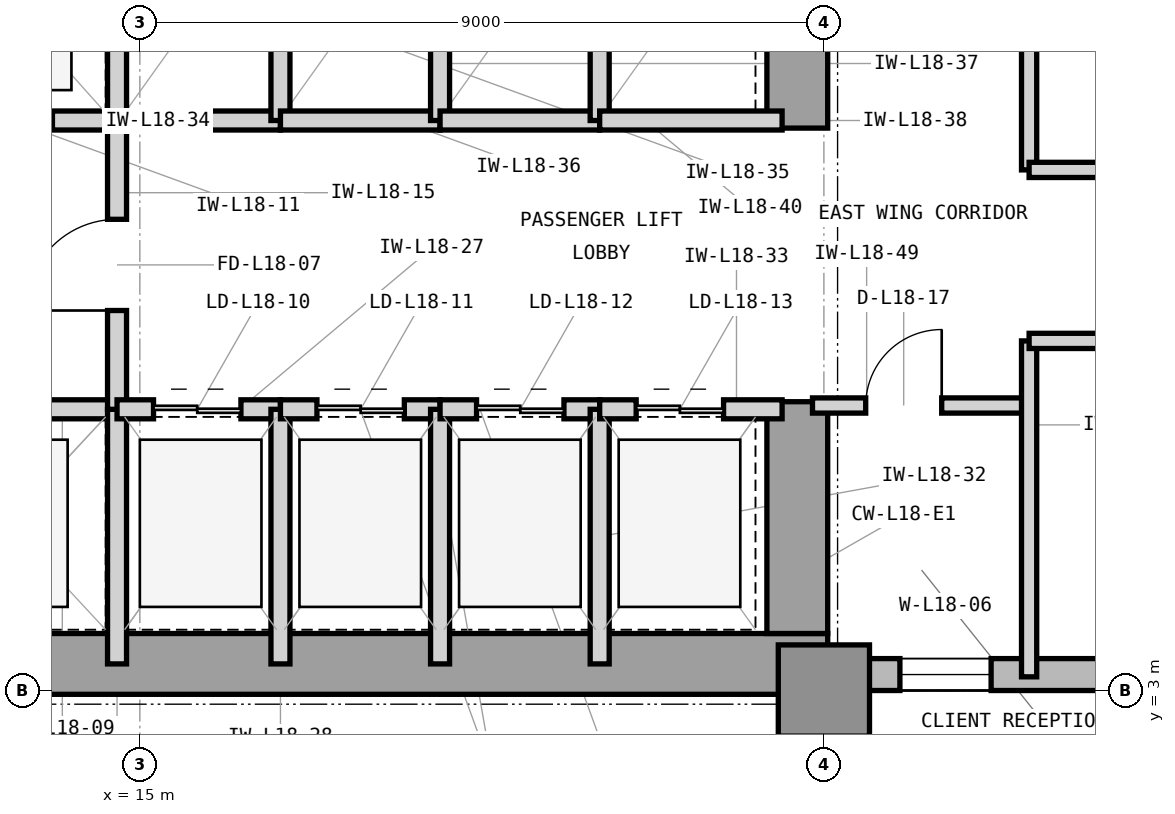
"""IFC4 building model, lengths in metres.
Left out: names, types, materials, properties, quantities, classifications, styles, units other than length and angle.
Written with IfcOpenShell. Run it as: python <this file> out.ifc"""

import sys

from ifc_helpers import new_model, si_unit, direction, frame, frame_2d, origin, origin_2d, place, context, subcontext, project, spatial, rectangle, extrude, element, fill, save


model = new_model("IFC4")
c1 = context("Model", 3, precision=1e-05, world=origin(), true_north=direction((0.0, 1.0)))
c2 = subcontext(c1, "Body", "Model", "MODEL_VIEW")
j1 = project(units=[si_unit("LENGTHUNIT", "METRE"), si_unit("PLANEANGLEUNIT", "RADIAN")], contexts=[c1])
p1 = place(None, origin())
s1 = spatial("IfcSite", under=j1, at=p1, CompositionType="ELEMENT")
p2 = place(p1, origin())
s2 = spatial("IfcBuilding", under=s1, at=p2, CompositionType="ELEMENT")
p3 = place(p2, frame((0.0, 0.0, 80.4)))
s3 = spatial("IfcBuildingStorey", under=s2, at=p3, CompositionType="ELEMENT", Elevation=80.4)
p4 = place(p3, frame((7.475, 3.35, 0.0), z_axis=(0.0, 0.0, 1.0), x_axis=(1.0, 0.0, 0.0)))
e1 = element("IfcWall", 1, at=p4, inside=s3, PredefinedType="SHEAR", context=c2, shape_type="SweptSolid", body=[
    extrude(rectangle(XDim=16.575, YDim=0.8, at=frame_2d((8.288, 0.0))), origin(), (0.0, 0.0, 1.0), 4.2),
])
p5 = place(p3, frame((23.65, 3.75, 0.0), z_axis=(0.0, 0.0, 1.0), x_axis=(0.0, 1.0, 0.0)))
e2 = element("IfcWall", 2, at=p5, inside=s3, PredefinedType="SHEAR", context=c2, shape_type="SweptSolid", body=[
    extrude(rectangle(XDim=3.05, YDim=0.8, at=frame_2d((1.525, 0.0))), origin(), (0.0, 0.0, 1.0), 4.2),
])
p6 = place(p3, frame((23.65, 10.4, 0.0), z_axis=(0.0, 0.0, 1.0), x_axis=(0.0, 1.0, 0.0)))
e3 = element("IfcWall", 3, at=p6, inside=s3, PredefinedType="SHEAR", context=c2, shape_type="SweptSolid", body=[
    extrude(rectangle(XDim=3.2, YDim=0.8, at=frame_2d((1.6, 0.0))), origin(), (0.0, 0.0, 1.0), 4.2),
])
p7 = place(p3, frame((24.0, 3.0, 0.0), z_axis=(0.0, 0.0, 1.0), x_axis=(1.0, 0.0, 0.0)))
e4 = element("IfcColumn", 4, at=p7, inside=s3, PredefinedType="COLUMN", context=c2, shape_type="SweptSolid", body=[
    extrude(rectangle(XDim=1.2, YDim=1.2, at=origin_2d()), origin(), (0.0, 0.0, 1.0), 4.2),
])
p8 = place(p3, frame((23.9, 3.21, 0.0), z_axis=(0.0, 0.0, 1.0), x_axis=(1.0, 0.0, 0.0)))
e5 = element("IfcWall", 5, at=p8, inside=s3, PredefinedType="STANDARD", context=c2, shape_type="SweptSolid", body=[
    extrude(rectangle(XDim=40.5, YDim=0.42, at=frame_2d((20.25, 0.0))), origin(), (0.0, 0.0, 1.0), 3.92),
])
p9 = place(p8, frame((1.1, 0.0, 0.85)))
e6 = element("IfcOpeningElement", 6, at=p9, cuts=e5, PredefinedType="OPENING", context=c2, shape_type="SweptSolid", body=[
    extrude(rectangle(XDim=1.2, YDim=2.45, at=frame_2d((0.6, 1.225))), frame((0.0, 0.22, 0.0), z_axis=(0.0, -1.0, 0.0), x_axis=(1.0, 0.0, 0.0)), (0.0, 0.0, 1.0), 0.44),
])
p10 = place(p8, frame((5.336, 0.0, 0.85)))
e7 = element("IfcOpeningElement", 7, at=p10, cuts=e5, PredefinedType="OPENING", context=c2, shape_type="SweptSolid", body=[
    extrude(rectangle(XDim=2.8, YDim=2.45, at=frame_2d((1.4, 1.225))), frame((0.0, 0.22, 0.0), z_axis=(0.0, -1.0, 0.0), x_axis=(1.0, 0.0, 0.0)), (0.0, 0.0, 1.0), 0.44),
])
p11 = place(p8, frame((14.136, 0.0, 0.85)))
e8 = element("IfcOpeningElement", 8, at=p11, cuts=e5, PredefinedType="OPENING", context=c2, shape_type="SweptSolid", body=[
    extrude(rectangle(XDim=2.8, YDim=2.45, at=frame_2d((1.4, 1.225))), frame((0.0, 0.22, 0.0), z_axis=(0.0, -1.0, 0.0), x_axis=(1.0, 0.0, 0.0)), (0.0, 0.0, 1.0), 0.44),
])
p12 = place(p8, frame((20.336, 0.0, 0.85)))
e9 = element("IfcOpeningElement", 9, at=p12, cuts=e5, PredefinedType="OPENING", context=c2, shape_type="SweptSolid", body=[
    extrude(rectangle(XDim=2.8, YDim=2.45, at=frame_2d((1.4, 1.225))), frame((0.0, 0.22, 0.0), z_axis=(0.0, -1.0, 0.0), x_axis=(1.0, 0.0, 0.0)), (0.0, 0.0, 1.0), 0.44),
])
p13 = place(p3, frame((11.82, 6.7, 0.0), z_axis=(0.0, 0.0, 1.0), x_axis=(1.0, 0.0, 0.0)))
e10 = element("IfcWall", 10, at=p13, inside=s3, PredefinedType="PARTITIONING", context=c2, shape_type="SweptSolid", body=[
    extrude(rectangle(XDim=2.88, YDim=0.25, at=frame_2d((1.44, 0.0))), origin(), (0.0, 0.0, 1.0), 3.293),
])
p14 = place(p13, frame((0.85, 0.0, 0.0)))
e11 = element("IfcOpeningElement", 11, at=p14, cuts=e10, PredefinedType="OPENING", context=c2, shape_type="SweptSolid", body=[
    extrude(rectangle(XDim=1.1, YDim=2.25, at=frame_2d((0.55, 1.125))), frame((0.0, 0.135, 0.0), z_axis=(0.0, -1.0, 0.0), x_axis=(1.0, 0.0, 0.0)), (0.0, 0.0, 1.0), 0.27),
])
p15 = place(p3, frame((14.7, 3.35, 0.0), z_axis=(0.0, 0.0, 1.0), x_axis=(0.0, 1.0, 0.0)))
e12 = element("IfcWall", 12, at=p15, inside=s3, PredefinedType="PARTITIONING", context=c2, shape_type="SweptSolid", body=[
    extrude(rectangle(XDim=3.35, YDim=0.25, at=frame_2d((1.675, 0.0))), origin(), (0.0, 0.0, 1.0), 3.91),
])
p16 = place(p3, frame((11.95, 10.5, 0.0), z_axis=(0.0, 0.0, 1.0), x_axis=(1.0, 0.0, 0.0)))
e13 = element("IfcWall", 13, at=p16, inside=s3, PredefinedType="PARTITIONING", context=c2, shape_type="SweptSolid", body=[
    extrude(rectangle(XDim=2.75, YDim=0.25, at=frame_2d((1.375, 0.0))), origin(), (0.0, 0.0, 1.0), 3.293),
])
p17 = place(p16, frame((0.8, 0.0, 0.0)))
e14 = element("IfcOpeningElement", 14, at=p17, cuts=e13, PredefinedType="OPENING", context=c2, shape_type="SweptSolid", body=[
    extrude(rectangle(XDim=1.1, YDim=2.25, at=frame_2d((0.55, 1.125))), frame((0.0, 0.135, 0.0), z_axis=(0.0, -1.0, 0.0), x_axis=(1.0, 0.0, 0.0)), (0.0, 0.0, 1.0), 0.27),
])
p18 = place(p3, frame((14.7, 10.5, 0.0), z_axis=(0.0, 0.0, 1.0), x_axis=(0.0, 1.0, 0.0)))
e15 = element("IfcWall", 15, at=p18, inside=s3, PredefinedType="PARTITIONING", context=c2, shape_type="SweptSolid", body=[
    extrude(rectangle(XDim=3.0, YDim=0.25, at=frame_2d((1.5, 0.0))), origin(), (0.0, 0.0, 1.0), 3.91),
])
p19 = place(p3, frame((14.7, 6.7, 0.0), z_axis=(0.0, 0.0, 1.0), x_axis=(0.0, 1.0, 0.0)))
e16 = element("IfcWall", 16, at=p19, inside=s3, PredefinedType="PARTITIONING", context=c2, shape_type="SweptSolid", body=[
    extrude(rectangle(XDim=3.8, YDim=0.25, at=frame_2d((1.9, 0.0))), origin(), (0.0, 0.0, 1.0), 3.91),
])
p20 = place(p19, frame((1.3, 0.0, 0.0)))
e17 = element("IfcOpeningElement", 17, at=p20, cuts=e16, PredefinedType="OPENING", context=c2, shape_type="SweptSolid", body=[
    extrude(rectangle(XDim=1.2, YDim=2.2, at=frame_2d((0.6, 1.1))), frame((0.0, 0.135, 0.0), z_axis=(0.0, -1.0, 0.0), x_axis=(1.0, 0.0, 0.0)), (0.0, 0.0, 1.0), 0.27),
])
p21 = place(p3, frame((14.7, 6.7, 0.0), z_axis=(0.0, 0.0, 1.0), x_axis=(1.0, 0.0, 0.0)))
e18 = element("IfcWall", 18, at=p21, inside=s3, PredefinedType="PARTITIONING", context=c2, shape_type="SweptSolid", body=[
    extrude(rectangle(XDim=2.15, YDim=0.25, at=frame_2d((1.075, 0.0))), origin(), (0.0, 0.0, 1.0), 3.293),
])
p22 = place(p21, frame((0.48, 0.0, 0.0)))
e19 = element("IfcOpeningElement", 19, at=p22, cuts=e18, PredefinedType="OPENING", context=c2, shape_type="SweptSolid", body=[
    extrude(rectangle(XDim=1.15, YDim=2.25, at=frame_2d((0.575, 1.125))), frame((0.0, 0.135, 0.0), z_axis=(0.0, -1.0, 0.0), x_axis=(1.0, 0.0, 0.0)), (0.0, 0.0, 1.0), 0.27),
])
p23 = place(p3, frame((16.85, 3.35, 0.0), z_axis=(0.0, 0.0, 1.0), x_axis=(0.0, 1.0, 0.0)))
e20 = element("IfcWall", 20, at=p23, inside=s3, PredefinedType="PARTITIONING", context=c2, shape_type="SweptSolid", body=[
    extrude(rectangle(XDim=3.35, YDim=0.25, at=frame_2d((1.675, 0.0))), origin(), (0.0, 0.0, 1.0), 3.91),
])
p24 = place(p3, frame((16.85, 6.7, 0.0), z_axis=(0.0, 0.0, 1.0), x_axis=(1.0, 0.0, 0.0)))
e21 = element("IfcWall", 21, at=p24, inside=s3, PredefinedType="PARTITIONING", context=c2, shape_type="SweptSolid", body=[
    extrude(rectangle(XDim=2.1, YDim=0.25, at=frame_2d((1.05, 0.0))), origin(), (0.0, 0.0, 1.0), 3.293),
])
p25 = place(p24, frame((0.48, 0.0, 0.0)))
e22 = element("IfcOpeningElement", 22, at=p25, cuts=e21, PredefinedType="OPENING", context=c2, shape_type="SweptSolid", body=[
    extrude(rectangle(XDim=1.15, YDim=2.25, at=frame_2d((0.575, 1.125))), frame((0.0, 0.135, 0.0), z_axis=(0.0, -1.0, 0.0), x_axis=(1.0, 0.0, 0.0)), (0.0, 0.0, 1.0), 0.27),
])
p26 = place(p3, frame((18.95, 3.35, 0.0), z_axis=(0.0, 0.0, 1.0), x_axis=(0.0, 1.0, 0.0)))
e23 = element("IfcWall", 23, at=p26, inside=s3, PredefinedType="PARTITIONING", context=c2, shape_type="SweptSolid", body=[
    extrude(rectangle(XDim=3.35, YDim=0.25, at=frame_2d((1.675, 0.0))), origin(), (0.0, 0.0, 1.0), 3.91),
])
p27 = place(p3, frame((18.95, 6.7, 0.0), z_axis=(0.0, 0.0, 1.0), x_axis=(1.0, 0.0, 0.0)))
e24 = element("IfcWall", 24, at=p27, inside=s3, PredefinedType="PARTITIONING", context=c2, shape_type="SweptSolid", body=[
    extrude(rectangle(XDim=2.1, YDim=0.25, at=frame_2d((1.05, 0.0))), origin(), (0.0, 0.0, 1.0), 3.293),
])
p28 = place(p27, frame((0.48, 0.0, 0.0)))
e25 = element("IfcOpeningElement", 25, at=p28, cuts=e24, PredefinedType="OPENING", context=c2, shape_type="SweptSolid", body=[
    extrude(rectangle(XDim=1.15, YDim=2.25, at=frame_2d((0.575, 1.125))), frame((0.0, 0.135, 0.0), z_axis=(0.0, -1.0, 0.0), x_axis=(1.0, 0.0, 0.0)), (0.0, 0.0, 1.0), 0.27),
])
p29 = place(p3, frame((21.05, 3.35, 0.0), z_axis=(0.0, 0.0, 1.0), x_axis=(0.0, 1.0, 0.0)))
e26 = element("IfcWall", 26, at=p29, inside=s3, PredefinedType="PARTITIONING", context=c2, shape_type="SweptSolid", body=[
    extrude(rectangle(XDim=3.35, YDim=0.25, at=frame_2d((1.675, 0.0))), origin(), (0.0, 0.0, 1.0), 3.91),
])
p30 = place(p3, frame((21.05, 6.7, 0.0), z_axis=(0.0, 0.0, 1.0), x_axis=(1.0, 0.0, 0.0)))
e27 = element("IfcWall", 27, at=p30, inside=s3, PredefinedType="PARTITIONING", context=c2, shape_type="SweptSolid", body=[
    extrude(rectangle(XDim=2.4, YDim=0.25, at=frame_2d((1.2, 0.0))), origin(), (0.0, 0.0, 1.0), 3.293),
])
p31 = place(p30, frame((0.48, 0.0, 0.0)))
e28 = element("IfcOpeningElement", 28, at=p31, cuts=e27, PredefinedType="OPENING", context=c2, shape_type="SweptSolid", body=[
    extrude(rectangle(XDim=1.15, YDim=2.25, at=frame_2d((0.575, 1.125))), frame((0.0, 0.135, 0.0), z_axis=(0.0, -1.0, 0.0), x_axis=(1.0, 0.0, 0.0)), (0.0, 0.0, 1.0), 0.27),
])
p32 = place(p3, frame((14.7, 10.5, 0.0), z_axis=(0.0, 0.0, 1.0), x_axis=(1.0, 0.0, 0.0)))
e29 = element("IfcWall", 29, at=p32, inside=s3, PredefinedType="PARTITIONING", context=c2, shape_type="SweptSolid", body=[
    extrude(rectangle(XDim=2.15, YDim=0.25, at=frame_2d((1.075, 0.0))), origin(), (0.0, 0.0, 1.0), 3.293),
])
p33 = place(p3, frame((16.85, 10.5, 0.0), z_axis=(0.0, 0.0, 1.0), x_axis=(0.0, 1.0, 0.0)))
e30 = element("IfcWall", 30, at=p33, inside=s3, PredefinedType="PARTITIONING", context=c2, shape_type="SweptSolid", body=[
    extrude(rectangle(XDim=3.0, YDim=0.25, at=frame_2d((1.5, 0.0))), origin(), (0.0, 0.0, 1.0), 3.91),
])
p34 = place(p3, frame((16.85, 10.5, 0.0), z_axis=(0.0, 0.0, 1.0), x_axis=(1.0, 0.0, 0.0)))
e31 = element("IfcWall", 31, at=p34, inside=s3, PredefinedType="PARTITIONING", context=c2, shape_type="SweptSolid", body=[
    extrude(rectangle(XDim=2.1, YDim=0.25, at=frame_2d((1.05, 0.0))), origin(), (0.0, 0.0, 1.0), 3.293),
])
p35 = place(p3, frame((18.95, 10.5, 0.0), z_axis=(0.0, 0.0, 1.0), x_axis=(0.0, 1.0, 0.0)))
e32 = element("IfcWall", 32, at=p35, inside=s3, PredefinedType="PARTITIONING", context=c2, shape_type="SweptSolid", body=[
    extrude(rectangle(XDim=3.0, YDim=0.25, at=frame_2d((1.5, 0.0))), origin(), (0.0, 0.0, 1.0), 3.91),
])
p36 = place(p3, frame((18.95, 10.5, 0.0), z_axis=(0.0, 0.0, 1.0), x_axis=(1.0, 0.0, 0.0)))
e33 = element("IfcWall", 33, at=p36, inside=s3, PredefinedType="PARTITIONING", context=c2, shape_type="SweptSolid", body=[
    extrude(rectangle(XDim=2.1, YDim=0.25, at=frame_2d((1.05, 0.0))), origin(), (0.0, 0.0, 1.0), 3.293),
])
p37 = place(p3, frame((21.05, 10.5, 0.0), z_axis=(0.0, 0.0, 1.0), x_axis=(0.0, 1.0, 0.0)))
e34 = element("IfcWall", 34, at=p37, inside=s3, PredefinedType="PARTITIONING", context=c2, shape_type="SweptSolid", body=[
    extrude(rectangle(XDim=3.0, YDim=0.25, at=frame_2d((1.5, 0.0))), origin(), (0.0, 0.0, 1.0), 3.91),
])
p38 = place(p3, frame((21.05, 10.5, 0.0), z_axis=(0.0, 0.0, 1.0), x_axis=(1.0, 0.0, 0.0)))
e35 = element("IfcWall", 35, at=p38, inside=s3, PredefinedType="PARTITIONING", context=c2, shape_type="SweptSolid", body=[
    extrude(rectangle(XDim=2.4, YDim=0.25, at=frame_2d((1.2, 0.0))), origin(), (0.0, 0.0, 1.0), 3.293),
])
p39 = place(p3, frame((23.85, 6.75, 0.0), z_axis=(0.0, 0.0, 1.0), x_axis=(1.0, 0.0, 0.0)))
e36 = element("IfcWall", 36, at=p39, inside=s3, PredefinedType="PARTITIONING", context=c2, shape_type="SweptSolid", body=[
    extrude(rectangle(XDim=2.85, YDim=0.2, at=frame_2d((1.425, 0.0))), origin(), (0.0, 0.0, 1.0), 3.91),
])
p40 = place(p39, frame((0.7, 0.0, 0.0)))
e37 = element("IfcOpeningElement", 37, at=p40, cuts=e36, PredefinedType="OPENING", context=c2, shape_type="SweptSolid", body=[
    extrude(rectangle(XDim=1.0, YDim=2.15, at=frame_2d((0.5, 1.075))), frame((0.0, 0.11, 0.0), z_axis=(0.0, -1.0, 0.0), x_axis=(1.0, 0.0, 0.0)), (0.0, 0.0, 1.0), 0.22),
])
p41 = place(p3, frame((26.7, 3.18, 0.0), z_axis=(0.0, 0.0, 1.0), x_axis=(0.0, 1.0, 0.0)))
e38 = element("IfcWall", 38, at=p41, inside=s3, PredefinedType="PARTITIONING", context=c2, shape_type="SweptSolid", body=[
    extrude(rectangle(XDim=4.42, YDim=0.2, at=frame_2d((2.21, 0.0))), origin(), (0.0, 0.0, 1.0), 3.91),
])
p42 = place(p3, frame((26.7, 9.85, 0.0), z_axis=(0.0, 0.0, 1.0), x_axis=(0.0, 1.0, 0.0)))
e39 = element("IfcWall", 39, at=p42, inside=s3, PredefinedType="PARTITIONING", context=c2, shape_type="SweptSolid", body=[
    extrude(rectangle(XDim=10.97, YDim=0.2, at=frame_2d((5.485, 0.0))), origin(), (0.0, 0.0, 1.0), 3.91),
])
p43 = place(p3, frame((26.7, 7.6, 0.0), z_axis=(0.0, 0.0, 1.0), x_axis=(1.0, 0.0, 0.0)))
e40 = element("IfcWall", 40, at=p43, inside=s3, PredefinedType="PARTITIONING", context=c2, shape_type="SweptSolid", body=[
    extrude(rectangle(XDim=9.0, YDim=0.2, at=frame_2d((4.5, 0.0))), origin(), (0.0, 0.0, 1.0), 3.91),
])
p44 = place(p43, frame((3.5, 0.0, 0.0)))
e41 = element("IfcOpeningElement", 41, at=p44, cuts=e40, PredefinedType="OPENING", context=c2, shape_type="SweptSolid", body=[
    extrude(rectangle(XDim=2.0, YDim=2.5, at=frame_2d((1.0, 1.25))), frame((0.0, 0.11, 0.0), z_axis=(0.0, -1.0, 0.0), x_axis=(1.0, 0.0, 0.0)), (0.0, 0.0, 1.0), 0.22),
])
p45 = place(p3, frame((26.7, 9.85, 0.0), z_axis=(0.0, 0.0, 1.0), x_axis=(1.0, 0.0, 0.0)))
e42 = element("IfcWall", 42, at=p45, inside=s3, PredefinedType="PARTITIONING", context=c2, shape_type="SweptSolid", body=[
    extrude(rectangle(XDim=8.5, YDim=0.2, at=frame_2d((4.25, 0.0))), origin(), (0.0, 0.0, 1.0), 3.91),
])
p46 = place(p45, frame((3.5, 0.0, 0.0)))
e43 = element("IfcOpeningElement", 43, at=p46, cuts=e42, PredefinedType="OPENING", context=c2, shape_type="SweptSolid", body=[
    extrude(rectangle(XDim=1.5, YDim=2.3, at=frame_2d((0.75, 1.15))), frame((0.0, 0.11, 0.0), z_axis=(0.0, -1.0, 0.0), x_axis=(1.0, 0.0, 0.0)), (0.0, 0.0, 1.0), 0.22),
])
p47 = place(p20, origin())
e44 = element("IfcDoor", 44, at=p47, inside=s3, OperationType="SINGLE_SWING_LEFT", PredefinedType="DOOR", context=c2, shape_type="SweptSolid", body=[
    extrude(rectangle(XDim=1.2, YDim=2.2, at=frame_2d((0.6, 1.1))), frame((0.0, 0.025, 0.0), z_axis=(0.0, -1.0, 0.0), x_axis=(1.0, 0.0, 0.0)), (0.0, 0.0, 1.0), 0.05),
])
fill(e17, e44)
p48 = place(p22, origin())
e45 = element("IfcDoor", 45, at=p48, inside=s3, OperationType="DOUBLE_DOOR_SLIDING", PredefinedType="DOOR", context=c2, shape_type="SweptSolid", body=[
    extrude(rectangle(XDim=1.15, YDim=2.25, at=frame_2d((0.575, 1.125))), frame((0.0, 0.025, 0.0), z_axis=(0.0, -1.0, 0.0), x_axis=(1.0, 0.0, 0.0)), (0.0, 0.0, 1.0), 0.05),
])
fill(e19, e45)
p49 = place(p25, origin())
e46 = element("IfcDoor", 46, at=p49, inside=s3, OperationType="DOUBLE_DOOR_SLIDING", PredefinedType="DOOR", context=c2, shape_type="SweptSolid", body=[
    extrude(rectangle(XDim=1.15, YDim=2.25, at=frame_2d((0.575, 1.125))), frame((0.0, 0.025, 0.0), z_axis=(0.0, -1.0, 0.0), x_axis=(1.0, 0.0, 0.0)), (0.0, 0.0, 1.0), 0.05),
])
fill(e22, e46)
p50 = place(p28, origin())
e47 = element("IfcDoor", 47, at=p50, inside=s3, OperationType="DOUBLE_DOOR_SLIDING", PredefinedType="DOOR", context=c2, shape_type="SweptSolid", body=[
    extrude(rectangle(XDim=1.15, YDim=2.25, at=frame_2d((0.575, 1.125))), frame((0.0, 0.025, 0.0), z_axis=(0.0, -1.0, 0.0), x_axis=(1.0, 0.0, 0.0)), (0.0, 0.0, 1.0), 0.05),
])
fill(e25, e47)
p51 = place(p31, origin())
e48 = element("IfcDoor", 48, at=p51, inside=s3, OperationType="DOUBLE_DOOR_SLIDING", PredefinedType="DOOR", context=c2, shape_type="SweptSolid", body=[
    extrude(rectangle(XDim=1.15, YDim=2.25, at=frame_2d((0.575, 1.125))), frame((0.0, 0.025, 0.0), z_axis=(0.0, -1.0, 0.0), x_axis=(1.0, 0.0, 0.0)), (0.0, 0.0, 1.0), 0.05),
])
fill(e28, e48)
p52 = place(p40, origin())
e49 = element("IfcDoor", 49, at=p52, inside=s3, OperationType="SINGLE_SWING_RIGHT", PredefinedType="DOOR", context=c2, shape_type="SweptSolid", body=[
    extrude(rectangle(XDim=1.0, YDim=2.15, at=frame_2d((0.5, 1.075))), frame((0.0, 0.025, 0.0), z_axis=(0.0, -1.0, 0.0), x_axis=(1.0, 0.0, 0.0)), (0.0, 0.0, 1.0), 0.05),
])
fill(e37, e49)
p53 = place(p9, origin())
e50 = element("IfcWindow", 50, at=p53, inside=s3, PartitioningType="SINGLE_PANEL", PredefinedType="WINDOW", context=c2, shape_type="SweptSolid", body=[
    extrude(rectangle(XDim=1.2, YDim=2.45, at=frame_2d((0.6, 1.225))), frame((0.0, 0.11, 0.0), z_axis=(0.0, -1.0, 0.0), x_axis=(1.0, 0.0, 0.0)), (0.0, 0.0, 1.0), 0.06),
])
fill(e6, e50)
save(model, sys.argv[1])
